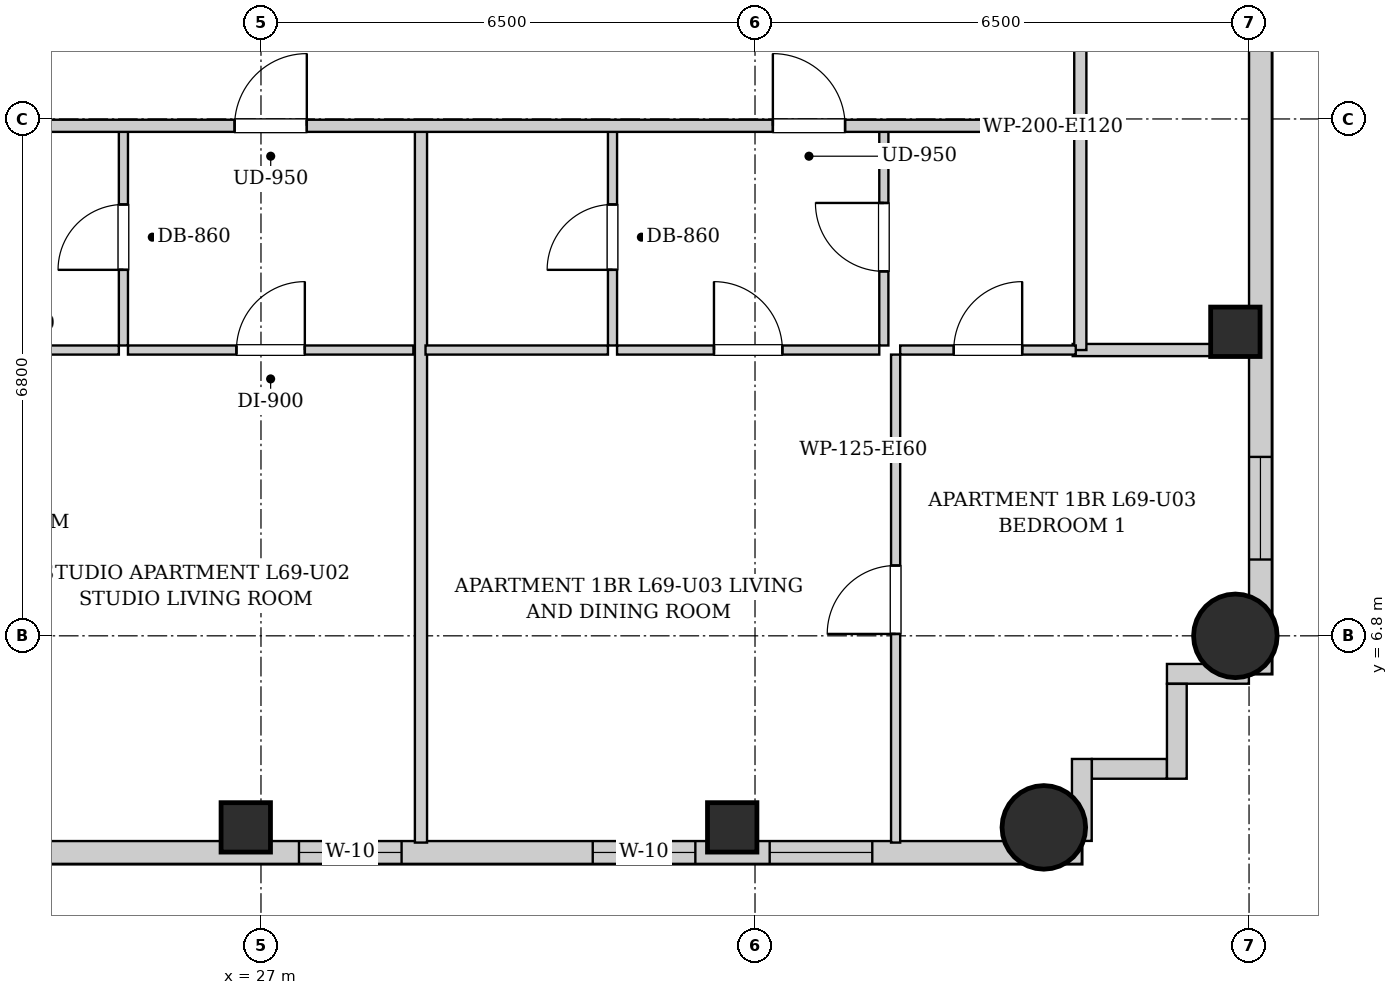
"""IFC4 building model, lengths in metres.
Left out: names, types, materials, properties, quantities, classifications, styles, units other than length and angle.
Written with IfcOpenShell. Run it as: python <this file> out.ifc"""

import sys

from ifc_helpers import new_model, si_unit, direction, frame, frame_2d, origin, origin_2d, place, context, subcontext, project, spatial, rectangle, circle, extrude, element, fill, save


model = new_model("IFC4")
c1 = context("Model", 3, precision=1e-05, world=origin(), true_north=direction((0.0, 1.0)))
c2 = subcontext(c1, "Body", "Model", "MODEL_VIEW")
j1 = project(units=[si_unit("LENGTHUNIT", "METRE"), si_unit("PLANEANGLEUNIT", "RADIAN")], contexts=[c1])
p1 = place(None, origin())
s1 = spatial("IfcSite", under=j1, at=p1, CompositionType="ELEMENT")
p2 = place(p1, origin())
s2 = spatial("IfcBuilding", under=s1, at=p2, CompositionType="ELEMENT")
p3 = place(p2, frame((0.0, 0.0, 237.7)))
s3 = spatial("IfcBuildingStorey", under=s2, at=p3, CompositionType="ELEMENT", Elevation=237.7)
for number, where, z_axis, x_axis in (
    (1, (26.8, 4.28, 0.0), (0.0, 0.0, 1.0), (1.0, 0.0, 0.0)),
    (2, (33.2, 4.28, 0.0), (0.0, 0.0, 1.0), (1.0, 0.0, 0.0)),
):
    element("IfcColumn", number, at=place(p3, frame(where, z_axis=z_axis, x_axis=x_axis)), inside=s3, PredefinedType="COLUMN", context=c2, shape_type="SweptSolid", body=[
        extrude(rectangle(XDim=0.65, YDim=0.65, at=origin_2d()), origin(), (0.0, 0.0, 1.0), 3.4),
    ])
for number, where, z_axis, x_axis in (
    (3, (37.3, 4.28, 0.0), (0.0, 0.0, 1.0), (1.0, 0.0, 0.0)),
    (4, (39.82, 6.8, 0.0), (0.0, 0.0, 1.0), (1.0, 0.0, 0.0)),
):
    element("IfcColumn", number, at=place(p3, frame(where, z_axis=z_axis, x_axis=x_axis)), inside=s3, PredefinedType="COLUMN", context=c2, shape_type="SweptSolid", body=[
        extrude(circle(Radius=0.55, at=origin_2d()), origin(), (0.0, 0.0, 1.0), 3.4),
    ])
p4 = place(p3, frame((39.82, 10.8, 0.0), z_axis=(0.0, 0.0, 1.0), x_axis=(1.0, 0.0, 0.0)))
e5 = element("IfcColumn", 5, at=p4, inside=s3, PredefinedType="COLUMN", context=c2, shape_type="SweptSolid", body=[
    extrude(rectangle(XDim=0.65, YDim=0.65, at=origin_2d()), origin(), (0.0, 0.0, 1.0), 3.4),
])
p5 = place(p3, frame((40.15, 37.7, 0.0), z_axis=(0.0, 0.0, 1.0), x_axis=(0.0, -1.0, 0.0)))
e6 = element("IfcWall", 6, at=p5, inside=s3, PredefinedType="SOLIDWALL", context=c2, shape_type="SweptSolid", body=[
    extrude(rectangle(XDim=31.4, YDim=0.3, at=frame_2d((15.7, 0.0))), origin(), (0.0, 0.0, 1.0), 3.14),
])
p6 = place(p5, frame((28.546, 0.0, 0.55)))
e7 = element("IfcOpeningElement", 7, at=p6, cuts=e6, PredefinedType="OPENING", context=c2, shape_type="SweptSolid", body=[
    extrude(rectangle(XDim=1.35, YDim=1.2, at=frame_2d((0.675, 0.6))), frame((0.0, 0.16, 0.0), z_axis=(0.0, -1.0, 0.0), x_axis=(1.0, 0.0, 0.0)), (0.0, 0.0, 1.0), 0.32),
])
p7 = place(p5, frame((1.504, 0.0, 0.55)))
e8 = element("IfcOpeningElement", 8, at=p7, cuts=e6, PredefinedType="OPENING", context=c2, shape_type="SweptSolid", body=[
    extrude(rectangle(XDim=1.35, YDim=1.2, at=frame_2d((0.675, 0.6))), frame((0.0, 0.16, 0.0), z_axis=(0.0, -1.0, 0.0), x_axis=(1.0, 0.0, 0.0)), (0.0, 0.0, 1.0), 0.32),
])
p8 = place(p5, frame((18.2, 0.0, 0.55)))
e9 = element("IfcOpeningElement", 9, at=p8, cuts=e6, PredefinedType="OPENING", context=c2, shape_type="SweptSolid", body=[
    extrude(rectangle(XDim=1.35, YDim=1.2, at=frame_2d((0.675, 0.6))), frame((0.0, 0.16, 0.0), z_axis=(0.0, -1.0, 0.0), x_axis=(1.0, 0.0, 0.0)), (0.0, 0.0, 1.0), 0.32),
])
p9 = place(p5, frame((19.81, 0.0, 0.55)))
e10 = element("IfcOpeningElement", 10, at=p9, cuts=e6, PredefinedType="OPENING", context=c2, shape_type="SweptSolid", body=[
    extrude(rectangle(XDim=1.35, YDim=1.2, at=frame_2d((0.675, 0.6))), frame((0.0, 0.16, 0.0), z_axis=(0.0, -1.0, 0.0), x_axis=(1.0, 0.0, 0.0)), (0.0, 0.0, 1.0), 0.32),
])
p10 = place(p5, frame((11.043, 0.0, 0.55)))
e11 = element("IfcOpeningElement", 11, at=p10, cuts=e6, PredefinedType="OPENING", context=c2, shape_type="SweptSolid", body=[
    extrude(rectangle(XDim=1.35, YDim=1.2, at=frame_2d((0.675, 0.6))), frame((0.0, 0.16, 0.0), z_axis=(0.0, -1.0, 0.0), x_axis=(1.0, 0.0, 0.0)), (0.0, 0.0, 1.0), 0.32),
])
p11 = place(p5, frame((9.185, 0.0, 0.55)))
e12 = element("IfcOpeningElement", 12, at=p11, cuts=e6, PredefinedType="OPENING", context=c2, shape_type="SweptSolid", body=[
    extrude(rectangle(XDim=1.35, YDim=1.2, at=frame_2d((0.675, 0.6))), frame((0.0, 0.16, 0.0), z_axis=(0.0, -1.0, 0.0), x_axis=(1.0, 0.0, 0.0)), (0.0, 0.0, 1.0), 0.32),
])
p12 = place(p3, frame((37.8, 3.95, 0.0), z_axis=(0.0, 0.0, 1.0), x_axis=(-1.0, 0.0, 0.0)))
e13 = element("IfcWall", 13, at=p12, inside=s3, PredefinedType="SOLIDWALL", context=c2, shape_type="SweptSolid", body=[
    extrude(rectangle(XDim=17.6, YDim=0.3, at=frame_2d((8.8, 0.0))), origin(), (0.0, 0.0, 1.0), 3.14),
])
p13 = place(p12, frame((15.345, 0.0, 0.55)))
e14 = element("IfcOpeningElement", 14, at=p13, cuts=e13, PredefinedType="OPENING", context=c2, shape_type="SweptSolid", body=[
    extrude(rectangle(XDim=1.35, YDim=1.2, at=frame_2d((0.675, 0.6))), frame((0.0, 0.16, 0.0), z_axis=(0.0, -1.0, 0.0), x_axis=(1.0, 0.0, 0.0)), (0.0, 0.0, 1.0), 0.32),
])
p14 = place(p12, frame((8.95, 0.0, 0.55)))
e15 = element("IfcOpeningElement", 15, at=p14, cuts=e13, PredefinedType="OPENING", context=c2, shape_type="SweptSolid", body=[
    extrude(rectangle(XDim=1.35, YDim=1.2, at=frame_2d((0.675, 0.6))), frame((0.0, 0.16, 0.0), z_axis=(0.0, -1.0, 0.0), x_axis=(1.0, 0.0, 0.0)), (0.0, 0.0, 1.0), 0.32),
])
p15 = place(p12, frame((5.085, 0.0, 0.55)))
e16 = element("IfcOpeningElement", 16, at=p15, cuts=e13, PredefinedType="OPENING", context=c2, shape_type="SweptSolid", body=[
    extrude(rectangle(XDim=1.35, YDim=1.2, at=frame_2d((0.675, 0.6))), frame((0.0, 0.16, 0.0), z_axis=(0.0, -1.0, 0.0), x_axis=(1.0, 0.0, 0.0)), (0.0, 0.0, 1.0), 0.32),
])
p16 = place(p12, frame((2.757, 0.0, 0.55)))
e17 = element("IfcOpeningElement", 17, at=p16, cuts=e13, PredefinedType="OPENING", context=c2, shape_type="SweptSolid", body=[
    extrude(rectangle(XDim=1.35, YDim=1.2, at=frame_2d((0.675, 0.6))), frame((0.0, 0.16, 0.0), z_axis=(0.0, -1.0, 0.0), x_axis=(1.0, 0.0, 0.0)), (0.0, 0.0, 1.0), 0.32),
])
p17 = place(p3, frame((39.998, 6.3, 0.0), z_axis=(0.0, 0.0, 1.0), x_axis=(-1.0, 0.0, 0.0)))
e18 = element("IfcWall", 18, at=p17, inside=s3, PredefinedType="SOLIDWALL", context=c2, shape_type="SweptSolid", body=[
    extrude(rectangle(XDim=1.078, YDim=0.26, at=frame_2d((0.539, 0.0))), origin(), (0.0, 0.0, 1.0), 3.14),
])
p18 = place(p3, frame((39.05, 6.168, 0.0), z_axis=(0.0, 0.0, 1.0), x_axis=(0.0, -1.0, 0.0)))
e19 = element("IfcWall", 19, at=p18, inside=s3, PredefinedType="SOLIDWALL", context=c2, shape_type="SweptSolid", body=[
    extrude(rectangle(XDim=1.248, YDim=0.26, at=frame_2d((0.624, 0.0))), origin(), (0.0, 0.0, 1.0), 3.14),
])
p19 = place(p3, frame((38.918, 5.05, 0.0), z_axis=(0.0, 0.0, 1.0), x_axis=(-1.0, 0.0, 0.0)))
e20 = element("IfcWall", 20, at=p19, inside=s3, PredefinedType="SOLIDWALL", context=c2, shape_type="SweptSolid", body=[
    extrude(rectangle(XDim=0.986, YDim=0.26, at=frame_2d((0.493, 0.0))), origin(), (0.0, 0.0, 1.0), 3.14),
])
p20 = place(p3, frame((37.8, 5.18, 0.0), z_axis=(0.0, 0.0, 1.0), x_axis=(0.0, -1.0, 0.0)))
e21 = element("IfcWall", 21, at=p20, inside=s3, PredefinedType="SOLIDWALL", context=c2, shape_type="SweptSolid", body=[
    extrude(rectangle(XDim=1.078, YDim=0.26, at=frame_2d((0.539, 0.0))), origin(), (0.0, 0.0, 1.0), 3.14),
])
p21 = place(p3, frame((37.78, 13.51, 0.0), z_axis=(0.0, 0.0, 1.0), x_axis=(0.0, 1.0, 0.0)))
e22 = element("IfcWall", 22, at=p21, inside=s3, PredefinedType="PARTITIONING", context=c2, shape_type="SweptSolid", body=[
    extrude(rectangle(XDim=1.58, YDim=0.16, at=frame_2d((0.79, 0.0))), origin(), (0.0, 0.0, 1.0), 3.14),
])
p22 = place(p3, frame((25.19, 10.62, 0.0), z_axis=(0.0, 0.0, 1.0), x_axis=(0.0, 1.0, 0.0)))
e23 = element("IfcWall", 23, at=p22, inside=s3, PredefinedType="PARTITIONING", context=c2, shape_type="SweptSolid", body=[
    extrude(rectangle(XDim=2.85, YDim=0.12, at=frame_2d((1.425, 0.0))), origin(), (0.0, 0.0, 1.0), 3.14),
])
p23 = place(p22, frame((0.995, 0.0, 0.0)))
e24 = element("IfcOpeningElement", 24, at=p23, cuts=e23, PredefinedType="OPENING", context=c2, shape_type="SweptSolid", body=[
    extrude(rectangle(XDim=0.86, YDim=2.05, at=frame_2d((0.43, 1.025))), frame((0.0, 0.07, 0.0), z_axis=(0.0, -1.0, 0.0), x_axis=(1.0, 0.0, 0.0)), (0.0, 0.0, 1.0), 0.14),
])
p24 = place(p3, frame((23.28, 10.56, 0.0), z_axis=(0.0, 0.0, 1.0), x_axis=(1.0, 0.0, 0.0)))
e25 = element("IfcWall", 25, at=p24, inside=s3, PredefinedType="PARTITIONING", context=c2, shape_type="SweptSolid", body=[
    extrude(rectangle(XDim=1.85, YDim=0.12, at=frame_2d((0.925, 0.0))), origin(), (0.0, 0.0, 1.0), 3.14),
])
p25 = place(p3, frame((25.25, 10.56, 0.0), z_axis=(0.0, 0.0, 1.0), x_axis=(1.0, 0.0, 0.0)))
e26 = element("IfcWall", 26, at=p25, inside=s3, PredefinedType="PARTITIONING", context=c2, shape_type="SweptSolid", body=[
    extrude(rectangle(XDim=3.755, YDim=0.12, at=frame_2d((1.877, 0.0))), origin(), (0.0, 0.0, 1.0), 3.14),
])
p26 = place(p25, frame((1.427, 0.0, 0.0)))
e27 = element("IfcOpeningElement", 27, at=p26, cuts=e26, PredefinedType="OPENING", context=c2, shape_type="SweptSolid", body=[
    extrude(rectangle(XDim=0.9, YDim=2.05, at=frame_2d((0.45, 1.025))), frame((0.0, 0.07, 0.0), z_axis=(0.0, -1.0, 0.0), x_axis=(1.0, 0.0, 0.0)), (0.0, 0.0, 1.0), 0.14),
])
p27 = place(p3, frame((37.68, 10.56, 0.0), z_axis=(0.0, 0.0, 1.0), x_axis=(1.0, 0.0, 0.0)))
e28 = element("IfcWall", 28, at=p27, inside=s3, PredefinedType="PARTITIONING", context=c2, shape_type="SweptSolid", body=[
    extrude(rectangle(XDim=2.34, YDim=0.16, at=frame_2d((1.17, 0.0))), origin(), (0.0, 0.0, 1.0), 3.14),
])
p28 = place(p3, frame((37.78, 10.56, 0.0), z_axis=(0.0, 0.0, 1.0), x_axis=(0.0, 1.0, 0.0)))
e29 = element("IfcWall", 29, at=p28, inside=s3, PredefinedType="PARTITIONING", context=c2, shape_type="SweptSolid", body=[
    extrude(rectangle(XDim=2.91, YDim=0.16, at=frame_2d((1.455, 0.0))), origin(), (0.0, 0.0, 1.0), 3.14),
])
p29 = place(p3, frame((29.105, 4.08, 0.0), z_axis=(0.0, 0.0, 1.0), x_axis=(0.0, 1.0, 0.0)))
e30 = element("IfcWall", 30, at=p29, inside=s3, PredefinedType="PARTITIONING", context=c2, shape_type="SweptSolid", body=[
    extrude(rectangle(XDim=9.39, YDim=0.16, at=frame_2d((4.695, 0.0))), origin(), (0.0, 0.0, 1.0), 3.14),
])
p30 = place(p3, frame((31.625, 10.62, 0.0), z_axis=(0.0, 0.0, 1.0), x_axis=(0.0, 1.0, 0.0)))
e31 = element("IfcWall", 31, at=p30, inside=s3, PredefinedType="PARTITIONING", context=c2, shape_type="SweptSolid", body=[
    extrude(rectangle(XDim=2.85, YDim=0.12, at=frame_2d((1.425, 0.0))), origin(), (0.0, 0.0, 1.0), 3.14),
])
p31 = place(p30, frame((0.995, 0.0, 0.0)))
e32 = element("IfcOpeningElement", 32, at=p31, cuts=e31, PredefinedType="OPENING", context=c2, shape_type="SweptSolid", body=[
    extrude(rectangle(XDim=0.86, YDim=2.05, at=frame_2d((0.43, 1.025))), frame((0.0, 0.07, 0.0), z_axis=(0.0, -1.0, 0.0), x_axis=(1.0, 0.0, 0.0)), (0.0, 0.0, 1.0), 0.14),
])
p32 = place(p3, frame((29.165, 10.56, 0.0), z_axis=(0.0, 0.0, 1.0), x_axis=(1.0, 0.0, 0.0)))
e33 = element("IfcWall", 33, at=p32, inside=s3, PredefinedType="PARTITIONING", context=c2, shape_type="SweptSolid", body=[
    extrude(rectangle(XDim=2.4, YDim=0.12, at=frame_2d((1.2, 0.0))), origin(), (0.0, 0.0, 1.0), 3.14),
])
p33 = place(p3, frame((35.195, 10.62, 0.0), z_axis=(0.0, 0.0, 1.0), x_axis=(0.0, 1.0, 0.0)))
e34 = element("IfcWall", 34, at=p33, inside=s3, PredefinedType="PARTITIONING", context=c2, shape_type="SweptSolid", body=[
    extrude(rectangle(XDim=2.85, YDim=0.12, at=frame_2d((1.425, 0.0))), origin(), (0.0, 0.0, 1.0), 3.14),
])
p34 = place(p33, frame((0.975, 0.0, 0.0)))
e35 = element("IfcOpeningElement", 35, at=p34, cuts=e34, PredefinedType="OPENING", context=c2, shape_type="SweptSolid", body=[
    extrude(rectangle(XDim=0.9, YDim=2.05, at=frame_2d((0.45, 1.025))), frame((0.0, 0.07, 0.0), z_axis=(0.0, -1.0, 0.0), x_axis=(1.0, 0.0, 0.0)), (0.0, 0.0, 1.0), 0.14),
])
p35 = place(p3, frame((31.685, 10.56, 0.0), z_axis=(0.0, 0.0, 1.0), x_axis=(1.0, 0.0, 0.0)))
e36 = element("IfcWall", 36, at=p35, inside=s3, PredefinedType="PARTITIONING", context=c2, shape_type="SweptSolid", body=[
    extrude(rectangle(XDim=3.45, YDim=0.12, at=frame_2d((1.725, 0.0))), origin(), (0.0, 0.0, 1.0), 3.14),
])
p36 = place(p35, frame((1.275, 0.0, 0.0)))
e37 = element("IfcOpeningElement", 37, at=p36, cuts=e36, PredefinedType="OPENING", context=c2, shape_type="SweptSolid", body=[
    extrude(rectangle(XDim=0.9, YDim=2.05, at=frame_2d((0.45, 1.025))), frame((0.0, 0.07, 0.0), z_axis=(0.0, -1.0, 0.0), x_axis=(1.0, 0.0, 0.0)), (0.0, 0.0, 1.0), 0.14),
])
p37 = place(p3, frame((35.41, 10.56, 0.0), z_axis=(0.0, 0.0, 1.0), x_axis=(1.0, 0.0, 0.0)))
e38 = element("IfcWall", 38, at=p37, inside=s3, PredefinedType="PARTITIONING", context=c2, shape_type="SweptSolid", body=[
    extrude(rectangle(XDim=2.31, YDim=0.12, at=frame_2d((1.155, 0.0))), origin(), (0.0, 0.0, 1.0), 3.14),
])
p38 = place(p37, frame((0.705, 0.0, 0.0)))
e39 = element("IfcOpeningElement", 39, at=p38, cuts=e38, PredefinedType="OPENING", context=c2, shape_type="SweptSolid", body=[
    extrude(rectangle(XDim=0.9, YDim=2.05, at=frame_2d((0.45, 1.025))), frame((0.0, 0.07, 0.0), z_axis=(0.0, -1.0, 0.0), x_axis=(1.0, 0.0, 0.0)), (0.0, 0.0, 1.0), 0.14),
])
p39 = place(p3, frame((35.35, 4.08, 0.0), z_axis=(0.0, 0.0, 1.0), x_axis=(0.0, 1.0, 0.0)))
e40 = element("IfcWall", 40, at=p39, inside=s3, PredefinedType="PARTITIONING", context=c2, shape_type="SweptSolid", body=[
    extrude(rectangle(XDim=6.42, YDim=0.12, at=frame_2d((3.21, 0.0))), origin(), (0.0, 0.0, 1.0), 3.14),
])
p40 = place(p39, frame((2.745, 0.0, 0.0)))
e41 = element("IfcOpeningElement", 41, at=p40, cuts=e40, PredefinedType="OPENING", context=c2, shape_type="SweptSolid", body=[
    extrude(rectangle(XDim=0.9, YDim=2.05, at=frame_2d((0.45, 1.025))), frame((0.0, 0.07, 0.0), z_axis=(0.0, -1.0, 0.0), x_axis=(1.0, 0.0, 0.0)), (0.0, 0.0, 1.0), 0.14),
])
p41 = place(p3, frame((13.15, 13.51, 0.0), z_axis=(0.0, 0.0, 1.0), x_axis=(1.0, 0.0, 0.0)))
e42 = element("IfcWall", 42, at=p41, inside=s3, PredefinedType="PARTITIONING", context=c2, shape_type="SweptSolid", body=[
    extrude(rectangle(XDim=24.6, YDim=0.16, at=frame_2d((12.3, 0.0))), origin(), (0.0, 0.0, 1.0), 3.14),
])
p42 = place(p41, frame((5.185, 0.0, 0.0)))
e43 = element("IfcOpeningElement", 43, at=p42, cuts=e42, PredefinedType="OPENING", context=c2, shape_type="SweptSolid", body=[
    extrude(rectangle(XDim=0.95, YDim=2.1, at=frame_2d((0.475, 1.05))), frame((0.0, 0.09, 0.0), z_axis=(0.0, -1.0, 0.0), x_axis=(1.0, 0.0, 0.0)), (0.0, 0.0, 1.0), 0.18),
])
p43 = place(p41, frame((13.503, 0.0, 0.0)))
e44 = element("IfcOpeningElement", 44, at=p43, cuts=e42, PredefinedType="OPENING", context=c2, shape_type="SweptSolid", body=[
    extrude(rectangle(XDim=0.95, YDim=2.1, at=frame_2d((0.475, 1.05))), frame((0.0, 0.09, 0.0), z_axis=(0.0, -1.0, 0.0), x_axis=(1.0, 0.0, 0.0)), (0.0, 0.0, 1.0), 0.18),
])
p44 = place(p41, frame((20.585, 0.0, 0.0)))
e45 = element("IfcOpeningElement", 45, at=p44, cuts=e42, PredefinedType="OPENING", context=c2, shape_type="SweptSolid", body=[
    extrude(rectangle(XDim=0.95, YDim=2.1, at=frame_2d((0.475, 1.05))), frame((0.0, 0.09, 0.0), z_axis=(0.0, -1.0, 0.0), x_axis=(1.0, 0.0, 0.0)), (0.0, 0.0, 1.0), 0.18),
])
p45 = place(p23, origin())
e46 = element("IfcDoor", 46, at=p45, inside=s3, OperationType="SINGLE_SWING_LEFT", PredefinedType="DOOR", context=c2, shape_type="SweptSolid", body=[
    extrude(rectangle(XDim=0.86, YDim=2.05, at=frame_2d((0.43, 1.025))), frame((0.0, 0.025, 0.0), z_axis=(0.0, -1.0, 0.0), x_axis=(1.0, 0.0, 0.0)), (0.0, 0.0, 1.0), 0.05),
])
fill(e24, e46)
p46 = place(p26, origin())
e47 = element("IfcDoor", 47, at=p46, inside=s3, OperationType="SINGLE_SWING_RIGHT", PredefinedType="DOOR", context=c2, shape_type="SweptSolid", body=[
    extrude(rectangle(XDim=0.9, YDim=2.05, at=frame_2d((0.45, 1.025))), frame((0.0, 0.025, 0.0), z_axis=(0.0, -1.0, 0.0), x_axis=(1.0, 0.0, 0.0)), (0.0, 0.0, 1.0), 0.05),
])
fill(e27, e47)
p47 = place(p31, origin())
e48 = element("IfcDoor", 48, at=p47, inside=s3, OperationType="SINGLE_SWING_LEFT", PredefinedType="DOOR", context=c2, shape_type="SweptSolid", body=[
    extrude(rectangle(XDim=0.86, YDim=2.05, at=frame_2d((0.43, 1.025))), frame((0.0, 0.025, 0.0), z_axis=(0.0, -1.0, 0.0), x_axis=(1.0, 0.0, 0.0)), (0.0, 0.0, 1.0), 0.05),
])
fill(e32, e48)
p48 = place(p34, origin())
e49 = element("IfcDoor", 49, at=p48, inside=s3, OperationType="SINGLE_SWING_RIGHT", PredefinedType="DOOR", context=c2, shape_type="SweptSolid", body=[
    extrude(rectangle(XDim=0.9, YDim=2.05, at=frame_2d((0.45, 1.025))), frame((0.0, 0.025, 0.0), z_axis=(0.0, -1.0, 0.0), x_axis=(1.0, 0.0, 0.0)), (0.0, 0.0, 1.0), 0.05),
])
fill(e35, e49)
p49 = place(p36, origin())
e50 = element("IfcDoor", 50, at=p49, inside=s3, OperationType="SINGLE_SWING_LEFT", PredefinedType="DOOR", context=c2, shape_type="SweptSolid", body=[
    extrude(rectangle(XDim=0.9, YDim=2.05, at=frame_2d((0.45, 1.025))), frame((0.0, 0.025, 0.0), z_axis=(0.0, -1.0, 0.0), x_axis=(1.0, 0.0, 0.0)), (0.0, 0.0, 1.0), 0.05),
])
fill(e37, e50)
p50 = place(p38, origin())
e51 = element("IfcDoor", 51, at=p50, inside=s3, OperationType="SINGLE_SWING_RIGHT", PredefinedType="DOOR", context=c2, shape_type="SweptSolid", body=[
    extrude(rectangle(XDim=0.9, YDim=2.05, at=frame_2d((0.45, 1.025))), frame((0.0, 0.025, 0.0), z_axis=(0.0, -1.0, 0.0), x_axis=(1.0, 0.0, 0.0)), (0.0, 0.0, 1.0), 0.05),
])
fill(e39, e51)
p51 = place(p40, origin())
e52 = element("IfcDoor", 52, at=p51, inside=s3, OperationType="SINGLE_SWING_LEFT", PredefinedType="DOOR", context=c2, shape_type="SweptSolid", body=[
    extrude(rectangle(XDim=0.9, YDim=2.05, at=frame_2d((0.45, 1.025))), frame((0.0, 0.025, 0.0), z_axis=(0.0, -1.0, 0.0), x_axis=(1.0, 0.0, 0.0)), (0.0, 0.0, 1.0), 0.05),
])
fill(e41, e52)
p52 = place(p43, origin())
e53 = element("IfcDoor", 53, at=p52, inside=s3, OperationType="SINGLE_SWING_RIGHT", PredefinedType="DOOR", context=c2, shape_type="SweptSolid", body=[
    extrude(rectangle(XDim=0.95, YDim=2.1, at=frame_2d((0.475, 1.05))), frame((0.0, 0.025, 0.0), z_axis=(0.0, -1.0, 0.0), x_axis=(1.0, 0.0, 0.0)), (0.0, 0.0, 1.0), 0.05),
])
fill(e44, e53)
p53 = place(p44, origin())
e54 = element("IfcDoor", 54, at=p53, inside=s3, OperationType="SINGLE_SWING_LEFT", PredefinedType="DOOR", context=c2, shape_type="SweptSolid", body=[
    extrude(rectangle(XDim=0.95, YDim=2.1, at=frame_2d((0.475, 1.05))), frame((0.0, 0.025, 0.0), z_axis=(0.0, -1.0, 0.0), x_axis=(1.0, 0.0, 0.0)), (0.0, 0.0, 1.0), 0.05),
])
fill(e45, e54)
p54 = place(p14, origin())
e55 = element("IfcWindow", 55, at=p54, inside=s3, PartitioningType="SINGLE_PANEL", PredefinedType="WINDOW", context=c2, shape_type="SweptSolid", body=[
    extrude(rectangle(XDim=1.35, YDim=1.2, at=frame_2d((0.675, 0.6))), frame((0.0, 0.03, 0.0), z_axis=(0.0, -1.0, 0.0), x_axis=(1.0, 0.0, 0.0)), (0.0, 0.0, 1.0), 0.06),
])
fill(e15, e55)
p55 = place(p15, origin())
e56 = element("IfcWindow", 56, at=p55, inside=s3, PartitioningType="SINGLE_PANEL", PredefinedType="WINDOW", context=c2, shape_type="SweptSolid", body=[
    extrude(rectangle(XDim=1.35, YDim=1.2, at=frame_2d((0.675, 0.6))), frame((0.0, 0.03, 0.0), z_axis=(0.0, -1.0, 0.0), x_axis=(1.0, 0.0, 0.0)), (0.0, 0.0, 1.0), 0.06),
])
fill(e16, e56)
p56 = place(p16, origin())
e57 = element("IfcWindow", 57, at=p56, inside=s3, PartitioningType="SINGLE_PANEL", PredefinedType="WINDOW", context=c2, shape_type="SweptSolid", body=[
    extrude(rectangle(XDim=1.35, YDim=1.2, at=frame_2d((0.675, 0.6))), frame((0.0, 0.03, 0.0), z_axis=(0.0, -1.0, 0.0), x_axis=(1.0, 0.0, 0.0)), (0.0, 0.0, 1.0), 0.06),
])
fill(e17, e57)
p57 = place(p6, origin())
e58 = element("IfcWindow", 58, at=p57, inside=s3, PartitioningType="SINGLE_PANEL", PredefinedType="WINDOW", context=c2, shape_type="SweptSolid", body=[
    extrude(rectangle(XDim=1.35, YDim=1.2, at=frame_2d((0.675, 0.6))), frame((0.0, 0.03, 0.0), z_axis=(0.0, -1.0, 0.0), x_axis=(1.0, 0.0, 0.0)), (0.0, 0.0, 1.0), 0.06),
])
fill(e7, e58)
save(model, sys.argv[1])
